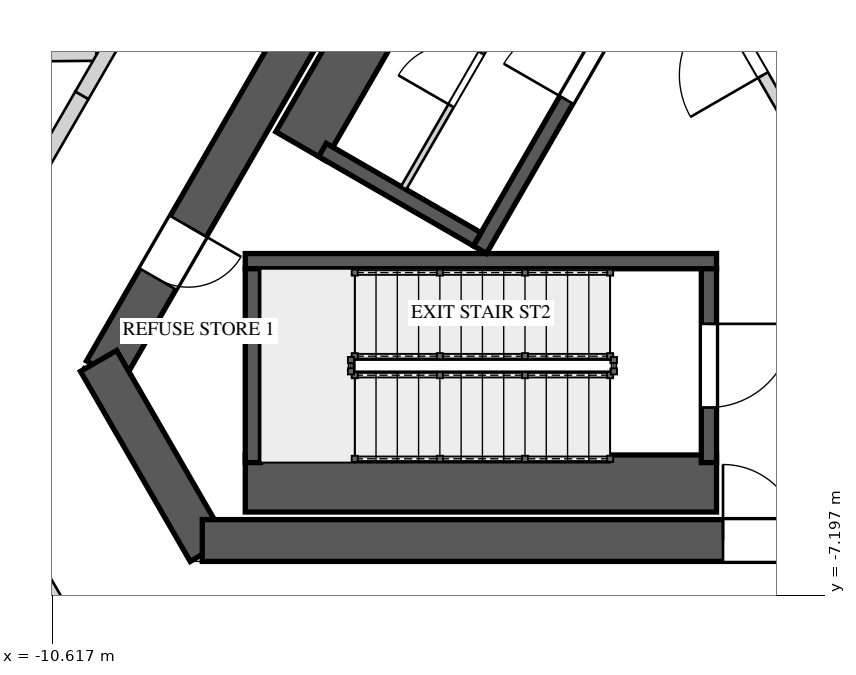
"""IFC4 building model, lengths in metres.
Left out: names, types, materials, properties, quantities, classifications, styles, units other than length and angle.
Written with IfcOpenShell. Run it as: python <this file> out.ifc"""

import sys

from ifc_helpers import new_model, si_unit, direction, frame, frame_2d, origin, place, context, subcontext, project, spatial, rectangle, extrude, element, fill, save


model = new_model("IFC4")
c1 = context("Model", 3, precision=1e-05, world=origin(), true_north=direction((0.0, 1.0)))
c2 = subcontext(c1, "Body", "Model", "MODEL_VIEW")
j1 = project(units=[si_unit("LENGTHUNIT", "METRE"), si_unit("PLANEANGLEUNIT", "RADIAN")], contexts=[c1])
p1 = place(None, origin())
s1 = spatial("IfcSite", under=j1, at=p1, CompositionType="ELEMENT")
p2 = place(p1, origin())
s2 = spatial("IfcBuilding", under=s1, at=p2, CompositionType="ELEMENT")
p3 = place(p2, frame((0.0, 0.0, 356.9)))
s3 = spatial("IfcBuildingStorey", under=s2, at=p3, CompositionType="ELEMENT", Elevation=356.9)
p4 = place(p3, frame((-1.285, 10.725, 0.0), z_axis=(0.0, 0.0, 1.0), x_axis=(-0.499994590896, -0.86602852671, 0.0)))
e1 = element("IfcWall", 1, at=p4, inside=s3, PredefinedType="SHEAR", context=c2, shape_type="SweptSolid", body=[
    extrude(rectangle(XDim=17.292, YDim=0.55, at=frame_2d((8.646, 0.0))), origin(), (0.0, 0.0, 1.0), 4.5),
])
p5 = place(p4, frame((6.851, 0.0, 0.0)))
e2 = element("IfcOpeningElement", 2, at=p5, cuts=e1, PredefinedType="OPENING", context=c2, shape_type="SweptSolid", body=[
    extrude(rectangle(XDim=1.0, YDim=2.4, at=frame_2d((0.5, 1.2))), frame((0.0, 0.285, 0.0), z_axis=(0.0, -1.0, 0.0), x_axis=(1.0, 0.0, 0.0)), (0.0, 0.0, 1.0), 0.57),
])
p6 = place(p4, frame((15.089, 0.0, 0.0)))
e3 = element("IfcOpeningElement", 3, at=p6, cuts=e1, PredefinedType="OPENING", context=c2, shape_type="SweptSolid", body=[
    extrude(rectangle(XDim=0.8, YDim=2.1, at=frame_2d((0.4, 1.05))), frame((0.0, 0.285, 0.0), z_axis=(0.0, -1.0, 0.0), x_axis=(1.0, 0.0, 0.0)), (0.0, 0.0, 1.0), 0.57),
])
p7 = place(p3, frame((-10.01, -4.113, 0.0), z_axis=(0.0, 0.0, 1.0), x_axis=(0.499995765644, -0.866027848477, 0.0)))
e4 = element("IfcWall", 4, at=p7, inside=s3, PredefinedType="SHEAR", context=c2, shape_type="SweptSolid", body=[
    extrude(rectangle(XDim=2.887, YDim=0.55, at=frame_2d((1.443, 0.0))), origin(), (0.0, 0.0, 1.0), 4.5),
])
p8 = place(p3, frame((-8.646, -6.475, 0.0), z_axis=(0.0, 0.0, 1.0), x_axis=(1.0, 0.0, 0.0)))
e5 = element("IfcWall", 5, at=p8, inside=s3, PredefinedType="SHEAR", context=c2, shape_type="SweptSolid", body=[
    extrude(rectangle(XDim=17.292, YDim=0.55, at=frame_2d((8.646, 0.0))), origin(), (0.0, 0.0, 1.0), 4.5),
])
p9 = place(p8, frame((6.851, 0.0, 0.0)))
e6 = element("IfcOpeningElement", 6, at=p9, cuts=e5, PredefinedType="OPENING", context=c2, shape_type="SweptSolid", body=[
    extrude(rectangle(XDim=1.0, YDim=2.4, at=frame_2d((0.5, 1.2))), frame((0.0, 0.285, 0.0), z_axis=(0.0, -1.0, 0.0), x_axis=(1.0, 0.0, 0.0)), (0.0, 0.0, 1.0), 0.57),
])
p10 = place(p8, frame((15.089, 0.0, 0.0)))
e7 = element("IfcOpeningElement", 7, at=p10, cuts=e5, PredefinedType="OPENING", context=c2, shape_type="SweptSolid", body=[
    extrude(rectangle(XDim=0.8, YDim=2.1, at=frame_2d((0.4, 1.05))), frame((0.0, 0.285, 0.0), z_axis=(0.0, -1.0, 0.0), x_axis=(1.0, 0.0, 0.0)), (0.0, 0.0, 1.0), 0.57),
])
p11 = place(p3, frame((-13.093, -6.868, 0.0), z_axis=(0.0, 0.0, 1.0), x_axis=(0.669136224502, -0.74313976684, 0.0)))
e8 = element("IfcWall", 8, at=p11, inside=s3, PredefinedType="SOLIDWALL", context=c2, shape_type="SweptSolid", body=[
    extrude(rectangle(XDim=7.314, YDim=0.45, at=frame_2d((3.657, 0.0))), origin(), (0.0, 0.0, 1.0), 3.8),
])
p12 = place(p3, frame((-8.08, -5.725, 0.0), z_axis=(0.0, 0.0, 1.0), x_axis=(1.0, 0.0, 0.0)))
e9 = element("IfcWall", 9, at=p12, inside=s3, PredefinedType="SOLIDWALL", context=c2, shape_type="SweptSolid", body=[
    extrude(rectangle(XDim=6.2, YDim=0.75, at=frame_2d((3.1, 0.0))), origin(), (0.0, 0.0, 1.0), 4.15),
])
p13 = place(p3, frame((-8.08, -2.8, 0.0), z_axis=(0.0, 0.0, 1.0), x_axis=(1.0, 0.0, 0.0)))
e10 = element("IfcWall", 10, at=p13, inside=s3, PredefinedType="SOLIDWALL", context=c2, shape_type="SweptSolid", body=[
    extrude(rectangle(XDim=6.2, YDim=0.2, at=frame_2d((3.1, 0.0))), origin(), (0.0, 0.0, 1.0), 4.15),
])
p14 = place(p3, frame((-7.98, -2.9, 0.0), z_axis=(0.0, 0.0, 1.0), x_axis=(0.0, -1.0, 0.0)))
e11 = element("IfcWall", 11, at=p14, inside=s3, PredefinedType="SOLIDWALL", context=c2, shape_type="SweptSolid", body=[
    extrude(rectangle(XDim=2.55, YDim=0.2, at=frame_2d((1.275, 0.0))), origin(), (0.0, 0.0, 1.0), 4.15),
])
p15 = place(p3, frame((-1.98, -2.9, 0.0), z_axis=(0.0, 0.0, 1.0), x_axis=(0.0, -1.0, 0.0)))
e12 = element("IfcWall", 12, at=p15, inside=s3, PredefinedType="SOLIDWALL", context=c2, shape_type="SweptSolid", body=[
    extrude(rectangle(XDim=2.55, YDim=0.2, at=frame_2d((1.275, 0.0))), origin(), (0.0, 0.0, 1.0), 4.15),
])
p16 = place(p15, frame((0.725, 0.0, 0.0)))
e13 = element("IfcOpeningElement", 13, at=p16, cuts=e12, PredefinedType="OPENING", context=c2, shape_type="SweptSolid", body=[
    extrude(rectangle(XDim=1.1, YDim=2.4, at=frame_2d((0.55, 1.2))), frame((0.0, 0.11, 0.0), z_axis=(0.0, -1.0, 0.0), x_axis=(1.0, 0.0, 0.0)), (0.0, 0.0, 1.0), 0.22),
])
p17 = place(p3, frame((-4.993, -2.648, 0.0), z_axis=(0.0, 0.0, 1.0), x_axis=(0.499996545922, 0.866027397988, 0.0)))
e14 = element("IfcWall", 14, at=p17, inside=s3, PredefinedType="SOLIDWALL", context=c2, shape_type="SweptSolid", body=[
    extrude(rectangle(XDim=5.5, YDim=0.2, at=frame_2d((2.75, 0.0))), origin(), (0.0, 0.0, 1.0), 4.15),
])
p18 = place(p17, frame((2.275, 0.0, 0.0)))
e15 = element("IfcOpeningElement", 15, at=p18, cuts=e14, PredefinedType="OPENING", context=c2, shape_type="SweptSolid", body=[
    extrude(rectangle(XDim=0.95, YDim=2.4, at=frame_2d((0.475, 1.2))), frame((0.0, 0.11, 0.0), z_axis=(0.0, -1.0, 0.0), x_axis=(1.0, 0.0, 0.0)), (0.0, 0.0, 1.0), 0.22),
])
p19 = place(p3, frame((-4.603, 3.477, 0.0), z_axis=(0.0, 0.0, 1.0), x_axis=(-0.500015767406, -0.866016300277, 0.0)))
e16 = element("IfcWall", 16, at=p19, inside=s3, PredefinedType="SOLIDWALL", context=c2, shape_type="SweptSolid", body=[
    extrude(rectangle(XDim=5.5, YDim=0.75, at=frame_2d((2.75, 0.0))), origin(), (0.0, 0.0, 1.0), 4.15),
])
p20 = place(p3, frame((-5.03, -2.512, 0.0), z_axis=(0.0, 0.0, 1.0), x_axis=(-0.866016039709, 0.500016218704, 0.0)))
e17 = element("IfcWall", 17, at=p20, inside=s3, PredefinedType="SOLIDWALL", context=c2, shape_type="SweptSolid", body=[
    extrude(rectangle(XDim=2.35, YDim=0.2, at=frame_2d((1.175, 0.0))), origin(), (0.0, 0.0, 1.0), 4.15),
])
p21 = place(p3, frame((-5.997, -1.838, 0.0), z_axis=(0.0, 0.0, 1.0), x_axis=(0.500005610874, 0.86602216432, 0.0)))
e18 = element("IfcWall", 18, at=p21, inside=s3, PredefinedType="PARTITIONING", context=c2, shape_type="SweptSolid", body=[
    extrude(rectangle(XDim=5.1, YDim=0.08, at=frame_2d((2.55, 0.0))), origin(), (0.0, 0.0, 1.0), 4.15),
])
p22 = place(p21, frame((1.25, 0.0, 0.0)))
e19 = element("IfcOpeningElement", 19, at=p22, cuts=e18, PredefinedType="OPENING", context=c2, shape_type="SweptSolid", body=[
    extrude(rectangle(XDim=0.8, YDim=2.1, at=frame_2d((0.4, 1.05))), frame((0.0, 0.05, 0.0), z_axis=(0.0, -1.0, 0.0), x_axis=(1.0, 0.0, 0.0)), (0.0, 0.0, 1.0), 0.1),
])
p23 = place(p3, frame((-0.744, -1.261, 0.0), z_axis=(0.0, 0.0, 1.0), x_axis=(-0.500004234368, 0.866022959057, 0.0)))
e20 = element("IfcWall", 20, at=p23, inside=s3, PredefinedType="PARTITIONING", context=c2, shape_type="SweptSolid", body=[
    extrude(rectangle(XDim=3.125, YDim=0.15, at=frame_2d((1.562, 0.0))), origin(), (0.0, 0.0, 1.0), 4.15),
])
p24 = place(p23, frame((1.05, 0.0, 0.0)))
e21 = element("IfcOpeningElement", 21, at=p24, cuts=e20, PredefinedType="OPENING", context=c2, shape_type="SweptSolid", body=[
    extrude(rectangle(XDim=1.1, YDim=2.4, at=frame_2d((0.55, 1.2))), frame((0.0, 0.085, 0.0), z_axis=(0.0, -1.0, 0.0), x_axis=(1.0, 0.0, 0.0)), (0.0, 0.0, 1.0), 0.17),
])
p25 = place(p3, frame((-10.04, -0.089, 0.0), z_axis=(0.0, 0.0, 1.0), x_axis=(-0.999960441248, -0.00889471414, 0.0)))
e22 = element("IfcWall", 22, at=p25, inside=s3, PredefinedType="PARTITIONING", context=c2, shape_type="SweptSolid", body=[
    extrude(rectangle(XDim=8.783, YDim=0.15, at=frame_2d((4.392, 0.0))), origin(), (0.0, 0.0, 1.0), 3.45),
])
p26 = place(p3, frame((-9.844, -8.55, 0.0), z_axis=(0.0, 0.0, 1.0), x_axis=(-0.500003959331, 0.866023117852, 0.0)))
e23 = element("IfcWall", 23, at=p26, inside=s3, PredefinedType="SOLIDWALL", context=c2, shape_type="SweptSolid", body=[
    extrude(rectangle(XDim=3.003, YDim=0.2, at=frame_2d((1.501, 0.0))), origin(), (0.0, 0.0, 1.0), 4.15),
])
p27 = place(p3, frame((-12.326, -4.25, 0.0), z_axis=(0.0, 0.0, 1.0), x_axis=(0.499982771656, 0.866035350345, 0.0)))
e24 = element("IfcWall", 24, at=p27, inside=s3, PredefinedType="SOLIDWALL", context=c2, shape_type="SweptSolid", body=[
    extrude(rectangle(XDim=4.195, YDim=0.2, at=frame_2d((2.097, 0.0))), origin(), (0.0, 0.0, 1.0), 4.15),
])
p28 = place(p3, frame((-10.229, -0.617, 0.0), z_axis=(0.0, 0.0, 1.0), x_axis=(0.5001686003, 0.865928040471, 0.0)))
e25 = element("IfcWall", 25, at=p28, inside=s3, PredefinedType="SOLIDWALL", context=c2, shape_type="SweptSolid", body=[
    extrude(rectangle(XDim=0.821, YDim=0.2, at=frame_2d((0.411, 0.0))), origin(), (0.0, 0.0, 1.0), 3.45),
])
p29 = place(p16, origin())
e26 = element("IfcDoor", 26, at=p29, inside=s3, OperationType="SINGLE_SWING_LEFT", PredefinedType="DOOR", context=c2, shape_type="SweptSolid", body=[
    extrude(rectangle(XDim=1.1, YDim=2.4, at=frame_2d((0.55, 1.2))), frame((0.0, 0.025, 0.0), z_axis=(0.0, -1.0, 0.0), x_axis=(1.0, 0.0, 0.0)), (0.0, 0.0, 1.0), 0.05),
])
fill(e13, e26)
p30 = place(p18, origin())
e27 = element("IfcDoor", 27, at=p30, inside=s3, OperationType="SINGLE_SWING_LEFT", PredefinedType="DOOR", context=c2, shape_type="SweptSolid", body=[
    extrude(rectangle(XDim=0.95, YDim=2.4, at=frame_2d((0.475, 1.2))), frame((0.0, 0.025, 0.0), z_axis=(0.0, -1.0, 0.0), x_axis=(1.0, 0.0, 0.0)), (0.0, 0.0, 1.0), 0.05),
])
fill(e15, e27)
p31 = place(p22, origin())
e28 = element("IfcDoor", 28, at=p31, inside=s3, OperationType="SINGLE_SWING_RIGHT", PredefinedType="DOOR", context=c2, shape_type="SweptSolid", body=[
    extrude(rectangle(XDim=0.8, YDim=2.1, at=frame_2d((0.4, 1.05))), frame((0.0, 0.025, 0.0), z_axis=(0.0, -1.0, 0.0), x_axis=(1.0, 0.0, 0.0)), (0.0, 0.0, 1.0), 0.05),
])
fill(e19, e28)
p32 = place(p24, origin())
e29 = element("IfcDoor", 29, at=p32, inside=s3, OperationType="SINGLE_SWING_LEFT", PredefinedType="DOOR", context=c2, shape_type="SweptSolid", body=[
    extrude(rectangle(XDim=1.1, YDim=2.4, at=frame_2d((0.55, 1.2))), frame((0.0, 0.025, 0.0), z_axis=(0.0, -1.0, 0.0), x_axis=(1.0, 0.0, 0.0)), (0.0, 0.0, 1.0), 0.05),
])
fill(e21, e29)
p33 = place(p9, origin())
e30 = element("IfcDoor", 30, at=p33, inside=s3, OperationType="SINGLE_SWING_LEFT", PredefinedType="DOOR", context=c2, shape_type="SweptSolid", body=[
    extrude(rectangle(XDim=1.0, YDim=2.4, at=frame_2d((0.5, 1.2))), frame((0.0, 0.025, 0.0), z_axis=(0.0, -1.0, 0.0), x_axis=(1.0, 0.0, 0.0)), (0.0, 0.0, 1.0), 0.05),
])
fill(e6, e30)
p34 = place(p6, origin())
e31 = element("IfcDoor", 31, at=p34, inside=s3, OperationType="SINGLE_SWING_LEFT", PredefinedType="DOOR", context=c2, shape_type="SweptSolid", body=[
    extrude(rectangle(XDim=0.8, YDim=2.1, at=frame_2d((0.4, 1.05))), frame((0.0, 0.025, 0.0), z_axis=(0.0, -1.0, 0.0), x_axis=(1.0, 0.0, 0.0)), (0.0, 0.0, 1.0), 0.05),
])
fill(e3, e31)
save(model, sys.argv[1])
